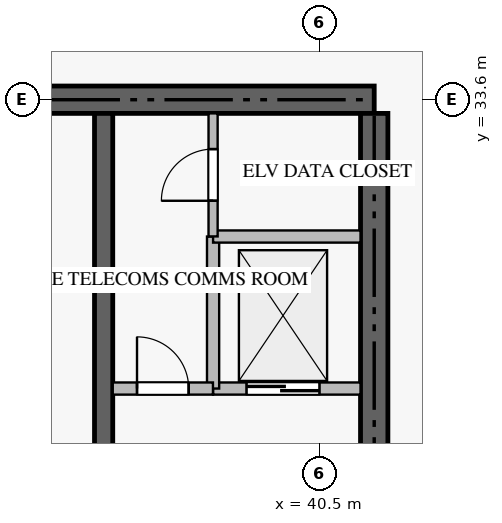
"""IFC4 building model, lengths in metres.
Left out: names, types, materials, properties, quantities, classifications, styles, units other than length and angle.
Written with IfcOpenShell. Run it as: python <this file> out.ifc"""

import sys

from ifc_helpers import new_model, si_unit, direction, frame, frame_2d, origin, place, context, subcontext, project, spatial, rectangle, extrude, source, transform, mapped, element, fill, save


model = new_model("IFC4")
c1 = context("Model", 3, precision=1e-05, world=origin(), true_north=direction((0.0, 1.0)))
c2 = subcontext(c1, "Body", "Model", "MODEL_VIEW")
j1 = project(units=[si_unit("LENGTHUNIT", "METRE"), si_unit("PLANEANGLEUNIT", "RADIAN")], contexts=[c1])
p1 = place(None, origin())
s1 = spatial("IfcSite", under=j1, at=p1, CompositionType="ELEMENT")
p2 = place(p1, origin())
s2 = spatial("IfcBuilding", under=s1, at=p2, CompositionType="ELEMENT")
p3 = place(p2, frame((0.0, 0.0, -10.8)))
s3 = spatial("IfcBuildingStorey", under=s2, at=p3, CompositionType="ELEMENT", Elevation=-10.8)
p4 = place(p3, frame((41.4, 33.6, 0.0), z_axis=(0.0, 0.0, 1.0), x_axis=(-1.0, 0.0, 0.0)))
e1 = element("IfcWall", 1, at=p4, inside=s3, PredefinedType="SHEAR", context=c2, shape_type="SweptSolid", body=[
    extrude(rectangle(XDim=18.0, YDim=0.45, at=frame_2d((9.0, 0.0))), origin(), (0.0, 0.0, 1.0), 3.238),
])
p5 = place(p3, frame((41.4, 27.75, 0.0), z_axis=(0.0, 0.0, 1.0), x_axis=(0.0, 1.0, 0.0)))
e2 = element("IfcWall", 2, at=p5, inside=s3, PredefinedType="SHEAR", context=c2, shape_type="SweptSolid", body=[
    extrude(rectangle(XDim=5.625, YDim=0.45, at=frame_2d((2.812, 0.0))), origin(), (0.0, 0.0, 1.0), 3.238),
])
p6 = place(p3, frame((36.95, 27.05, 0.0), z_axis=(0.0, 0.0, 1.0), x_axis=(0.0, 1.0, 0.0)))
e3 = element("IfcWall", 3, at=p6, inside=s3, PredefinedType="SHEAR", context=c2, shape_type="SweptSolid", body=[
    extrude(rectangle(XDim=6.325, YDim=0.3, at=frame_2d((3.163, 0.0))), origin(), (0.0, 0.0, 1.0), 3.238),
])
p7 = place(p3, frame((38.75, 28.85, 0.0), z_axis=(0.0, 0.0, 1.0), x_axis=(1.0, 0.0, 0.0)))
e4 = element("IfcWall", 4, at=p7, inside=s3, PredefinedType="STANDARD", context=c2, shape_type="SweptSolid", body=[
    extrude(rectangle(XDim=2.425, YDim=0.2, at=frame_2d((1.212, 0.0))), origin(), (0.0, 0.0, 1.0), 3.24),
])
p8 = place(p7, frame((0.55, 0.0, 0.0)))
e5 = element("IfcOpeningElement", 5, at=p8, cuts=e4, PredefinedType="OPENING", context=c2, shape_type="SweptSolid", body=[
    extrude(rectangle(XDim=1.2, YDim=2.2, at=frame_2d((0.6, 1.1))), frame((0.0, 0.11, 0.0), z_axis=(0.0, -1.0, 0.0), x_axis=(1.0, 0.0, 0.0)), (0.0, 0.0, 1.0), 0.22),
])
p9 = place(p3, frame((38.75, 28.85, 0.0), z_axis=(0.0, 0.0, 1.0), x_axis=(0.0, 1.0, 0.0)))
e6 = element("IfcWall", 6, at=p9, inside=s3, PredefinedType="STANDARD", context=c2, shape_type="SweptSolid", body=[
    extrude(rectangle(XDim=2.5, YDim=0.2, at=frame_2d((1.25, 0.0))), origin(), (0.0, 0.0, 1.0), 3.24),
])
p10 = place(p3, frame((38.75, 31.35, 0.0), z_axis=(0.0, 0.0, 1.0), x_axis=(1.0, 0.0, 0.0)))
e7 = element("IfcWall", 7, at=p10, inside=s3, PredefinedType="STANDARD", context=c2, shape_type="SweptSolid", body=[
    extrude(rectangle(XDim=2.425, YDim=0.2, at=frame_2d((1.212, 0.0))), origin(), (0.0, 0.0, 1.0), 3.24),
])
p11 = place(p3, frame((37.1, 28.85, 0.0), z_axis=(0.0, 0.0, 1.0), x_axis=(1.0, 0.0, 0.0)))
e8 = element("IfcWall", 8, at=p11, inside=s3, PredefinedType="STANDARD", context=c2, shape_type="SweptSolid", body=[
    extrude(rectangle(XDim=1.648, YDim=0.2, at=frame_2d((0.824, 0.0))), origin(), (0.0, 0.0, 1.0), 3.24),
])
p12 = place(p11, frame((0.399, 0.0, 0.0)))
e9 = element("IfcOpeningElement", 9, at=p12, cuts=e8, PredefinedType="OPENING", context=c2, shape_type="SweptSolid", body=[
    extrude(rectangle(XDim=0.85, YDim=2.1, at=frame_2d((0.425, 1.05))), frame((0.0, 0.11, 0.0), z_axis=(0.0, -1.0, 0.0), x_axis=(1.0, 0.0, 0.0)), (0.0, 0.0, 1.0), 0.22),
])
p13 = place(p3, frame((28.0, 30.55, 0.0), z_axis=(0.0, 0.0, 1.0), x_axis=(1.0, 0.0, 0.0)))
e10 = element("IfcWall", 10, at=p13, inside=s3, PredefinedType="STANDARD", context=c2, shape_type="SweptSolid", body=[
    extrude(rectangle(XDim=8.8, YDim=0.2, at=frame_2d((4.4, 0.0))), origin(), (0.0, 0.0, 1.0), 3.24),
])
p14 = place(p3, frame((38.75, 31.352, 0.0), z_axis=(0.0, 0.0, 1.0), x_axis=(0.0, 1.0, 0.0)))
e11 = element("IfcWall", 11, at=p14, inside=s3, PredefinedType="PARTITIONING", context=c2, shape_type="SweptSolid", body=[
    extrude(rectangle(XDim=2.023, YDim=0.15, at=frame_2d((1.011, 0.0))), origin(), (0.0, 0.0, 1.0), 3.24),
])
p15 = place(p14, frame((0.586, 0.0, 0.0)))
e12 = element("IfcOpeningElement", 12, at=p15, cuts=e11, PredefinedType="OPENING", context=c2, shape_type="SweptSolid", body=[
    extrude(rectangle(XDim=0.85, YDim=2.1, at=frame_2d((0.425, 1.05))), frame((0.0, 0.085, 0.0), z_axis=(0.0, -1.0, 0.0), x_axis=(1.0, 0.0, 0.0)), (0.0, 0.0, 1.0), 0.17),
])
m1 = source(origin(), c2, "Body", "SweptSolid", [
    extrude(rectangle(XDim=1.2, YDim=2.2, at=frame_2d((0.6, 1.1))), frame((0.0, 0.025, 0.0), z_axis=(0.0, -1.0, 0.0), x_axis=(1.0, 0.0, 0.0)), (0.0, 0.0, 1.0), 0.05),
])
p16 = place(p8, origin())
e13 = element("IfcDoor", 13, at=p16, inside=s3, OperationType="DOUBLE_DOOR_SLIDING", PredefinedType="DOOR", context=c2, shape_type="MappedRepresentation", body=[
    mapped(m1, transform((0.0, 0.0, 0.0), scale=1.0)),
])
fill(e5, e13)
m2 = source(origin(), c2, "Body", "SweptSolid", [
    extrude(rectangle(XDim=0.85, YDim=2.1, at=frame_2d((0.425, 1.05))), frame((0.0, 0.025, 0.0), z_axis=(0.0, -1.0, 0.0), x_axis=(1.0, 0.0, 0.0)), (0.0, 0.0, 1.0), 0.05),
])
p17 = place(p12, origin())
e14 = element("IfcDoor", 14, at=p17, inside=s3, OperationType="SINGLE_SWING_LEFT", PredefinedType="DOOR", context=c2, shape_type="MappedRepresentation", body=[
    mapped(m2, transform((0.0, 0.0, 0.0), scale=1.0)),
])
fill(e9, e14)
p18 = place(p15, origin())
e15 = element("IfcDoor", 15, at=p18, inside=s3, OperationType="SINGLE_SWING_LEFT", PredefinedType="DOOR", context=c2, shape_type="MappedRepresentation", body=[
    mapped(m2, transform((0.0, 0.0, 0.0), scale=1.0)),
])
fill(e12, e15)
save(model, sys.argv[1])
